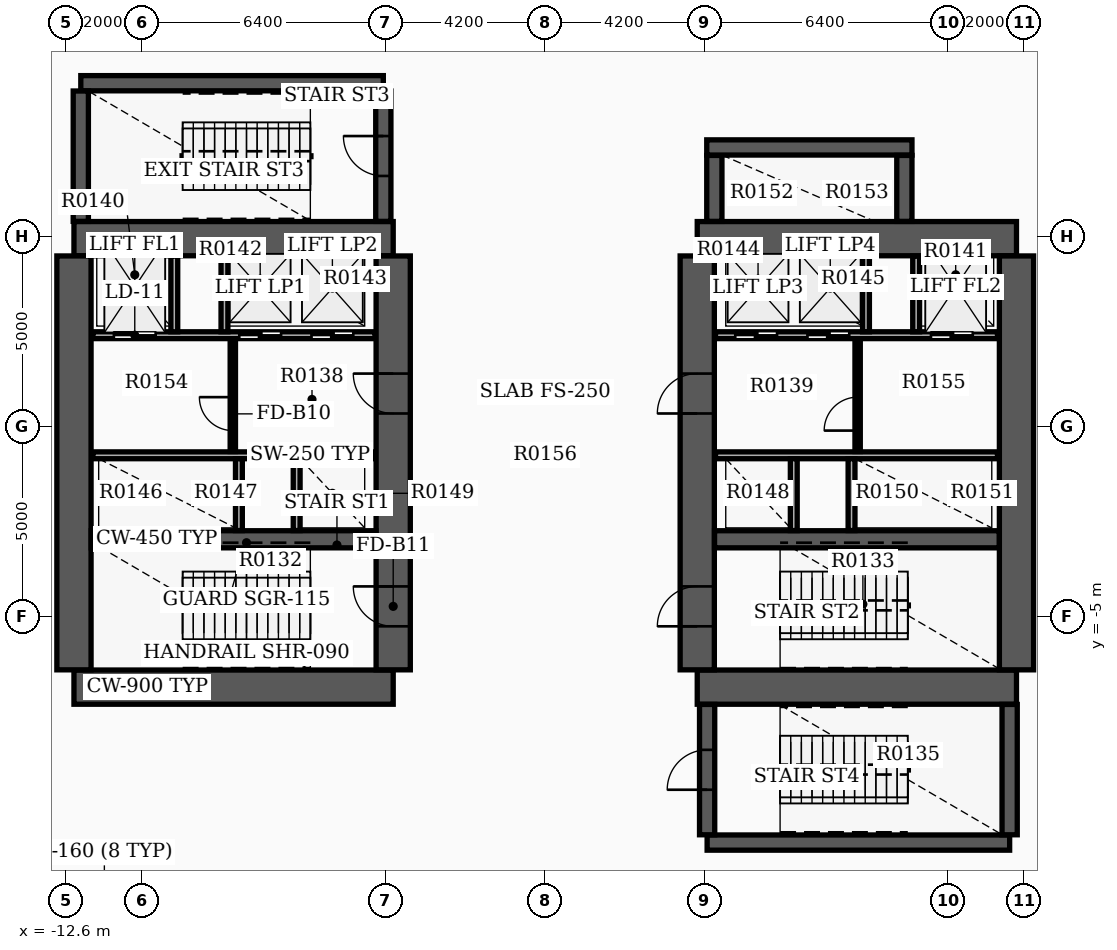
"""IFC4 building model, lengths in metres.
Left out: names, types, materials, properties, quantities, classifications, styles, units other than length and angle.
Written with IfcOpenShell. Run it as: python <this file> out.ifc"""

import sys

from ifc_helpers import new_model, si_unit, direction, frame, frame_2d, origin, place, context, subcontext, project, spatial, rectangle, extrude, element, fill, save


model = new_model("IFC4")
c1 = context("Model", 3, precision=1e-05, world=origin(), true_north=direction((0.0, 1.0)))
c2 = subcontext(c1, "Body", "Model", "MODEL_VIEW")
j1 = project(units=[si_unit("LENGTHUNIT", "METRE"), si_unit("PLANEANGLEUNIT", "RADIAN")], contexts=[c1])
p1 = place(None, origin())
s1 = spatial("IfcSite", under=j1, at=p1, CompositionType="ELEMENT")
p2 = place(p1, origin())
s2 = spatial("IfcBuilding", under=s1, at=p2, CompositionType="ELEMENT")
p3 = place(p2, frame((0.0, 0.0, 5.4)))
s3 = spatial("IfcBuildingStorey", under=s2, at=p3, CompositionType="ELEMENT", Elevation=5.4)
for number, where, z_axis, x_axis in (
    (1, (-12.4, -6.85, 0.0), (0.0, 0.0, 1.0), (1.0, 0.0, 0.0)),
    (2, (-12.4, 4.95, 0.0), (0.0, 0.0, 1.0), (1.0, 0.0, 0.0)),
):
    element("IfcWall", number, at=place(p3, frame(where, z_axis=z_axis, x_axis=x_axis)), inside=s3, PredefinedType="SHEAR", context=c2, shape_type="SweptSolid", body=[
        extrude(rectangle(XDim=8.4, YDim=0.9, at=frame_2d((4.2, 0.0))), origin(), (0.0, 0.0, 1.0), 4.55),
    ])
p4 = place(p3, frame((-12.4, -6.395, 0.0), z_axis=(0.0, 0.0, 1.0), x_axis=(0.0, 1.0, 0.0)))
e3 = element("IfcWall", 3, at=p4, inside=s3, PredefinedType="SHEAR", context=c2, shape_type="SweptSolid", body=[
    extrude(rectangle(XDim=10.89, YDim=0.9, at=frame_2d((5.445, 0.0))), origin(), (0.0, 0.0, 1.0), 4.55),
])
p5 = place(p3, frame((-4.0, -6.395, 0.0), z_axis=(0.0, 0.0, 1.0), x_axis=(0.0, 1.0, 0.0)))
e4 = element("IfcWall", 4, at=p5, inside=s3, PredefinedType="SHEAR", context=c2, shape_type="SweptSolid", body=[
    extrude(rectangle(XDim=10.89, YDim=0.9, at=frame_2d((5.445, 0.0))), origin(), (0.0, 0.0, 1.0), 4.55),
])
p6 = place(p5, frame((1.145, 0.0, 0.0)))
e5 = element("IfcOpeningElement", 5, at=p6, cuts=e4, PredefinedType="OPENING", context=c2, shape_type="SweptSolid", body=[
    extrude(rectangle(XDim=1.05, YDim=2.15, at=frame_2d((0.525, 1.075))), frame((0.0, 0.46, 0.0), z_axis=(0.0, -1.0, 0.0), x_axis=(1.0, 0.0, 0.0)), (0.0, 0.0, 1.0), 0.92),
])
p7 = place(p5, frame((6.745, 0.0, 0.0)))
e6 = element("IfcOpeningElement", 6, at=p7, cuts=e4, PredefinedType="OPENING", context=c2, shape_type="SweptSolid", body=[
    extrude(rectangle(XDim=1.05, YDim=2.15, at=frame_2d((0.525, 1.075))), frame((0.0, 0.46, 0.0), z_axis=(0.0, -1.0, 0.0), x_axis=(1.0, 0.0, 0.0)), (0.0, 0.0, 1.0), 0.92),
])
p8 = place(p3, frame((-11.945, -2.96, 0.0), z_axis=(0.0, 0.0, 1.0), x_axis=(1.0, 0.0, 0.0)))
e7 = element("IfcWall", 7, at=p8, inside=s3, PredefinedType="SHEAR", context=c2, shape_type="SweptSolid", body=[
    extrude(rectangle(XDim=7.49, YDim=0.45, at=frame_2d((3.745, 0.0))), origin(), (0.0, 0.0, 1.0), 4.55),
])
for number, where, z_axis, x_axis in (
    (8, (4.0, -6.85, 0.0), (0.0, 0.0, 1.0), (1.0, 0.0, 0.0)),
    (9, (4.0, 4.95, 0.0), (0.0, 0.0, 1.0), (1.0, 0.0, 0.0)),
):
    element("IfcWall", number, at=place(p3, frame(where, z_axis=z_axis, x_axis=x_axis)), inside=s3, PredefinedType="SHEAR", context=c2, shape_type="SweptSolid", body=[
        extrude(rectangle(XDim=8.4, YDim=0.9, at=frame_2d((4.2, 0.0))), origin(), (0.0, 0.0, 1.0), 4.55),
    ])
p9 = place(p3, frame((4.0, -6.395, 0.0), z_axis=(0.0, 0.0, 1.0), x_axis=(0.0, 1.0, 0.0)))
e10 = element("IfcWall", 10, at=p9, inside=s3, PredefinedType="SHEAR", context=c2, shape_type="SweptSolid", body=[
    extrude(rectangle(XDim=10.89, YDim=0.9, at=frame_2d((5.445, 0.0))), origin(), (0.0, 0.0, 1.0), 4.55),
])
p10 = place(p9, frame((1.145, 0.0, 0.0)))
e11 = element("IfcOpeningElement", 11, at=p10, cuts=e10, PredefinedType="OPENING", context=c2, shape_type="SweptSolid", body=[
    extrude(rectangle(XDim=1.05, YDim=2.15, at=frame_2d((0.525, 1.075))), frame((0.0, 0.46, 0.0), z_axis=(0.0, -1.0, 0.0), x_axis=(1.0, 0.0, 0.0)), (0.0, 0.0, 1.0), 0.92),
])
p11 = place(p9, frame((6.745, 0.0, 0.0)))
e12 = element("IfcOpeningElement", 12, at=p11, cuts=e10, PredefinedType="OPENING", context=c2, shape_type="SweptSolid", body=[
    extrude(rectangle(XDim=1.05, YDim=2.15, at=frame_2d((0.525, 1.075))), frame((0.0, 0.46, 0.0), z_axis=(0.0, -1.0, 0.0), x_axis=(1.0, 0.0, 0.0)), (0.0, 0.0, 1.0), 0.92),
])
p12 = place(p3, frame((12.4, -6.395, 0.0), z_axis=(0.0, 0.0, 1.0), x_axis=(0.0, 1.0, 0.0)))
e13 = element("IfcWall", 13, at=p12, inside=s3, PredefinedType="SHEAR", context=c2, shape_type="SweptSolid", body=[
    extrude(rectangle(XDim=10.89, YDim=0.9, at=frame_2d((5.445, 0.0))), origin(), (0.0, 0.0, 1.0), 4.55),
])
p13 = place(p3, frame((4.455, -2.96, 0.0), z_axis=(0.0, 0.0, 1.0), x_axis=(1.0, 0.0, 0.0)))
e14 = element("IfcWall", 14, at=p13, inside=s3, PredefinedType="SHEAR", context=c2, shape_type="SweptSolid", body=[
    extrude(rectangle(XDim=7.49, YDim=0.45, at=frame_2d((3.745, 0.0))), origin(), (0.0, 0.0, 1.0), 4.55),
])
p14 = place(p3, frame((-12.22, 9.04, 0.0), z_axis=(0.0, 0.0, 1.0), x_axis=(1.0, 0.0, 0.0)))
e15 = element("IfcWall", 15, at=p14, inside=s3, PredefinedType="SHEAR", context=c2, shape_type="SweptSolid", body=[
    extrude(rectangle(XDim=7.96, YDim=0.4, at=frame_2d((3.98, 0.0))), origin(), (0.0, 0.0, 1.0), 4.55),
])
p15 = place(p3, frame((-12.22, 5.405, 0.0), z_axis=(0.0, 0.0, 1.0), x_axis=(0.0, 1.0, 0.0)))
e16 = element("IfcWall", 16, at=p15, inside=s3, PredefinedType="SHEAR", context=c2, shape_type="SweptSolid", body=[
    extrude(rectangle(XDim=3.43, YDim=0.4, at=frame_2d((1.715, 0.0))), origin(), (0.0, 0.0, 1.0), 4.55),
])
p16 = place(p3, frame((-4.26, 5.405, 0.0), z_axis=(0.0, 0.0, 1.0), x_axis=(0.0, 1.0, 0.0)))
e17 = element("IfcWall", 17, at=p16, inside=s3, PredefinedType="SHEAR", context=c2, shape_type="SweptSolid", body=[
    extrude(rectangle(XDim=3.43, YDim=0.4, at=frame_2d((1.715, 0.0))), origin(), (0.0, 0.0, 1.0), 4.55),
])
p17 = place(p16, frame((1.195, 0.0, 0.0)))
e18 = element("IfcOpeningElement", 18, at=p17, cuts=e17, PredefinedType="OPENING", context=c2, shape_type="SweptSolid", body=[
    extrude(rectangle(XDim=1.05, YDim=2.15, at=frame_2d((0.525, 1.075))), frame((0.0, 0.21, 0.0), z_axis=(0.0, -1.0, 0.0), x_axis=(1.0, 0.0, 0.0)), (0.0, 0.0, 1.0), 0.42),
])
p18 = place(p3, frame((4.26, -10.94, 0.0), z_axis=(0.0, 0.0, 1.0), x_axis=(1.0, 0.0, 0.0)))
e19 = element("IfcWall", 19, at=p18, inside=s3, PredefinedType="SHEAR", context=c2, shape_type="SweptSolid", body=[
    extrude(rectangle(XDim=7.96, YDim=0.4, at=frame_2d((3.98, 0.0))), origin(), (0.0, 0.0, 1.0), 4.55),
])
p19 = place(p3, frame((4.26, -10.735, 0.0), z_axis=(0.0, 0.0, 1.0), x_axis=(0.0, 1.0, 0.0)))
e20 = element("IfcWall", 20, at=p19, inside=s3, PredefinedType="SHEAR", context=c2, shape_type="SweptSolid", body=[
    extrude(rectangle(XDim=3.43, YDim=0.4, at=frame_2d((1.715, 0.0))), origin(), (0.0, 0.0, 1.0), 4.55),
])
p20 = place(p19, frame((1.185, 0.0, 0.0)))
e21 = element("IfcOpeningElement", 21, at=p20, cuts=e20, PredefinedType="OPENING", context=c2, shape_type="SweptSolid", body=[
    extrude(rectangle(XDim=1.05, YDim=2.15, at=frame_2d((0.525, 1.075))), frame((0.0, 0.21, 0.0), z_axis=(0.0, -1.0, 0.0), x_axis=(1.0, 0.0, 0.0)), (0.0, 0.0, 1.0), 0.42),
])
p21 = place(p3, frame((12.22, -10.735, 0.0), z_axis=(0.0, 0.0, 1.0), x_axis=(0.0, 1.0, 0.0)))
e22 = element("IfcWall", 22, at=p21, inside=s3, PredefinedType="SHEAR", context=c2, shape_type="SweptSolid", body=[
    extrude(rectangle(XDim=3.43, YDim=0.4, at=frame_2d((1.715, 0.0))), origin(), (0.0, 0.0, 1.0), 4.55),
])
p22 = place(p3, frame((4.45, 5.405, 0.0), z_axis=(0.0, 0.0, 1.0), x_axis=(0.0, 1.0, 0.0)))
e23 = element("IfcWall", 23, at=p22, inside=s3, PredefinedType="SHEAR", context=c2, shape_type="SweptSolid", body=[
    extrude(rectangle(XDim=1.735, YDim=0.4, at=frame_2d((0.867, 0.0))), origin(), (0.0, 0.0, 1.0), 4.55),
])
p23 = place(p3, frame((4.25, 7.35, 0.0), z_axis=(0.0, 0.0, 1.0), x_axis=(1.0, 0.0, 0.0)))
e24 = element("IfcWall", 24, at=p23, inside=s3, PredefinedType="SHEAR", context=c2, shape_type="SweptSolid", body=[
    extrude(rectangle(XDim=5.4, YDim=0.4, at=frame_2d((2.7, 0.0))), origin(), (0.0, 0.0, 1.0), 4.55),
])
p24 = place(p3, frame((9.45, 5.405, 0.0), z_axis=(0.0, 0.0, 1.0), x_axis=(0.0, 1.0, 0.0)))
e25 = element("IfcWall", 25, at=p24, inside=s3, PredefinedType="SHEAR", context=c2, shape_type="SweptSolid", body=[
    extrude(rectangle(XDim=1.735, YDim=0.4, at=frame_2d((0.867, 0.0))), origin(), (0.0, 0.0, 1.0), 4.55),
])
p25 = place(p3, frame((-11.9, 2.41, 0.0), z_axis=(0.0, 0.0, 1.0), x_axis=(1.0, 0.0, 0.0)))
e26 = element("IfcWall", 26, at=p25, inside=s3, PredefinedType="SOLIDWALL", context=c2, shape_type="SweptSolid", body=[
    extrude(rectangle(XDim=7.42, YDim=0.18, at=frame_2d((3.71, 0.0))), origin(), (0.0, 0.0, 1.0), 3.62),
])
p26 = place(p25, frame((0.55, 0.0, 0.0)))
e27 = element("IfcOpeningElement", 27, at=p26, cuts=e26, PredefinedType="OPENING", context=c2, shape_type="SweptSolid", body=[
    extrude(rectangle(XDim=1.1, YDim=2.15, at=frame_2d((0.55, 1.075))), frame((0.0, 0.1, 0.0), z_axis=(0.0, -1.0, 0.0), x_axis=(1.0, 0.0, 0.0)), (0.0, 0.0, 1.0), 0.2),
])
p27 = place(p25, frame((3.85, 0.0, 0.0)))
e28 = element("IfcOpeningElement", 28, at=p27, cuts=e26, PredefinedType="OPENING", context=c2, shape_type="SweptSolid", body=[
    extrude(rectangle(XDim=1.1, YDim=2.15, at=frame_2d((0.55, 1.075))), frame((0.0, 0.1, 0.0), z_axis=(0.0, -1.0, 0.0), x_axis=(1.0, 0.0, 0.0)), (0.0, 0.0, 1.0), 0.2),
])
p28 = place(p25, frame((5.75, 0.0, 0.0)))
e29 = element("IfcOpeningElement", 29, at=p28, cuts=e26, PredefinedType="OPENING", context=c2, shape_type="SweptSolid", body=[
    extrude(rectangle(XDim=1.1, YDim=2.15, at=frame_2d((0.55, 1.075))), frame((0.0, 0.1, 0.0), z_axis=(0.0, -1.0, 0.0), x_axis=(1.0, 0.0, 0.0)), (0.0, 0.0, 1.0), 0.2),
])
p29 = place(p3, frame((4.48, 2.41, 0.0), z_axis=(0.0, 0.0, 1.0), x_axis=(1.0, 0.0, 0.0)))
e30 = element("IfcWall", 30, at=p29, inside=s3, PredefinedType="SOLIDWALL", context=c2, shape_type="SweptSolid", body=[
    extrude(rectangle(XDim=7.42, YDim=0.18, at=frame_2d((3.71, 0.0))), origin(), (0.0, 0.0, 1.0), 3.62),
])
p30 = place(p29, frame((5.67, 0.0, 0.0)))
e31 = element("IfcOpeningElement", 31, at=p30, cuts=e30, PredefinedType="OPENING", context=c2, shape_type="SweptSolid", body=[
    extrude(rectangle(XDim=1.1, YDim=2.15, at=frame_2d((0.55, 1.075))), frame((0.0, 0.1, 0.0), z_axis=(0.0, -1.0, 0.0), x_axis=(1.0, 0.0, 0.0)), (0.0, 0.0, 1.0), 0.2),
])
p31 = place(p29, frame((0.52, 0.0, 0.0)))
e32 = element("IfcOpeningElement", 32, at=p31, cuts=e30, PredefinedType="OPENING", context=c2, shape_type="SweptSolid", body=[
    extrude(rectangle(XDim=1.1, YDim=2.15, at=frame_2d((0.55, 1.075))), frame((0.0, 0.1, 0.0), z_axis=(0.0, -1.0, 0.0), x_axis=(1.0, 0.0, 0.0)), (0.0, 0.0, 1.0), 0.2),
])
p32 = place(p29, frame((2.42, 0.0, 0.0)))
e33 = element("IfcOpeningElement", 33, at=p32, cuts=e30, PredefinedType="OPENING", context=c2, shape_type="SweptSolid", body=[
    extrude(rectangle(XDim=1.1, YDim=2.15, at=frame_2d((0.55, 1.075))), frame((0.0, 0.1, 0.0), z_axis=(0.0, -1.0, 0.0), x_axis=(1.0, 0.0, 0.0)), (0.0, 0.0, 1.0), 0.2),
])
for number, where, z_axis, x_axis in (
    (34, (-11.9, -0.75, 0.0), (0.0, 0.0, 1.0), (1.0, 0.0, 0.0)),
    (35, (4.48, -0.75, 0.0), (0.0, 0.0, 1.0), (1.0, 0.0, 0.0)),
):
    element("IfcWall", number, at=place(p3, frame(where, z_axis=z_axis, x_axis=x_axis)), inside=s3, PredefinedType="SOLIDWALL", context=c2, shape_type="SweptSolid", body=[
        extrude(rectangle(XDim=7.42, YDim=0.18, at=frame_2d((3.71, 0.0))), origin(), (0.0, 0.0, 1.0), 3.62),
    ])
for number, where, z_axis, x_axis in (
    (36, (-9.76, 2.5, 0.0), (0.0, 0.0, 1.0), (0.0, 1.0, 0.0)),
    (37, (-8.44, 2.5, 0.0), (0.0, 0.0, 1.0), (0.0, 1.0, 0.0)),
    (38, (8.44, 2.5, 0.0), (0.0, 0.0, 1.0), (0.0, 1.0, 0.0)),
    (39, (9.76, 2.5, 0.0), (0.0, 0.0, 1.0), (0.0, 1.0, 0.0)),
):
    element("IfcWall", number, at=place(p3, frame(where, z_axis=z_axis, x_axis=x_axis)), inside=s3, PredefinedType="SOLIDWALL", context=c2, shape_type="SweptSolid", body=[
        extrude(rectangle(XDim=1.99, YDim=0.18, at=frame_2d((0.995, 0.0))), origin(), (0.0, 0.0, 1.0), 3.62),
    ])
for number, where, z_axis, x_axis in (
    (40, (-8.06, -2.73, 0.0), (0.0, 0.0, 1.0), (0.0, 1.0, 0.0)),
    (41, (-6.54, -2.73, 0.0), (0.0, 0.0, 1.0), (0.0, 1.0, 0.0)),
    (42, (6.54, -2.73, 0.0), (0.0, 0.0, 1.0), (0.0, 1.0, 0.0)),
    (43, (8.06, -2.73, 0.0), (0.0, 0.0, 1.0), (0.0, 1.0, 0.0)),
):
    element("IfcWall", number, at=place(p3, frame(where, z_axis=z_axis, x_axis=x_axis)), inside=s3, PredefinedType="SOLIDWALL", context=c2, shape_type="SweptSolid", body=[
        extrude(rectangle(XDim=1.89, YDim=0.18, at=frame_2d((0.945, 0.0))), origin(), (0.0, 0.0, 1.0), 3.62),
    ])
p33 = place(p3, frame((-8.22, -0.65, 0.0), z_axis=(0.0, 0.0, 1.0), x_axis=(0.0, 1.0, 0.0)))
e44 = element("IfcWall", 44, at=p33, inside=s3, PredefinedType="SOLIDWALL", context=c2, shape_type="SweptSolid", body=[
    extrude(rectangle(XDim=2.96, YDim=0.14, at=frame_2d((1.48, 0.0))), origin(), (0.0, 0.0, 1.0), 3.62),
])
p34 = place(p33, frame((0.55, 0.0, 0.0)))
e45 = element("IfcOpeningElement", 45, at=p34, cuts=e44, PredefinedType="OPENING", context=c2, shape_type="SweptSolid", body=[
    extrude(rectangle(XDim=0.88, YDim=2.1, at=frame_2d((0.44, 1.05))), frame((0.0, 0.08, 0.0), z_axis=(0.0, -1.0, 0.0), x_axis=(1.0, 0.0, 0.0)), (0.0, 0.0, 1.0), 0.16),
])
p35 = place(p3, frame((8.22, -0.65, 0.0), z_axis=(0.0, 0.0, 1.0), x_axis=(0.0, 1.0, 0.0)))
e46 = element("IfcWall", 46, at=p35, inside=s3, PredefinedType="SOLIDWALL", context=c2, shape_type="SweptSolid", body=[
    extrude(rectangle(XDim=2.96, YDim=0.14, at=frame_2d((1.48, 0.0))), origin(), (0.0, 0.0, 1.0), 3.62),
])
p36 = place(p35, frame((0.55, 0.0, 0.0)))
e47 = element("IfcOpeningElement", 47, at=p36, cuts=e46, PredefinedType="OPENING", context=c2, shape_type="SweptSolid", body=[
    extrude(rectangle(XDim=0.88, YDim=2.1, at=frame_2d((0.44, 1.05))), frame((0.0, 0.08, 0.0), z_axis=(0.0, -1.0, 0.0), x_axis=(1.0, 0.0, 0.0)), (0.0, 0.0, 1.0), 0.16),
])
p37 = place(p6, origin())
e48 = element("IfcDoor", 48, at=p37, inside=s3, OperationType="SINGLE_SWING_RIGHT", PredefinedType="DOOR", context=c2, shape_type="SweptSolid", body=[
    extrude(rectangle(XDim=1.05, YDim=2.15, at=frame_2d((0.525, 1.075))), frame((0.0, 0.025, 0.0), z_axis=(0.0, -1.0, 0.0), x_axis=(1.0, 0.0, 0.0)), (0.0, 0.0, 1.0), 0.05),
])
fill(e5, e48)
p38 = place(p10, origin())
e49 = element("IfcDoor", 49, at=p38, inside=s3, OperationType="SINGLE_SWING_LEFT", PredefinedType="DOOR", context=c2, shape_type="SweptSolid", body=[
    extrude(rectangle(XDim=1.05, YDim=2.15, at=frame_2d((0.525, 1.075))), frame((0.0, 0.025, 0.0), z_axis=(0.0, -1.0, 0.0), x_axis=(1.0, 0.0, 0.0)), (0.0, 0.0, 1.0), 0.05),
])
fill(e11, e49)
p39 = place(p7, origin())
e50 = element("IfcDoor", 50, at=p39, inside=s3, OperationType="SINGLE_SWING_RIGHT", PredefinedType="DOOR", context=c2, shape_type="SweptSolid", body=[
    extrude(rectangle(XDim=1.05, YDim=2.15, at=frame_2d((0.525, 1.075))), frame((0.0, 0.025, 0.0), z_axis=(0.0, -1.0, 0.0), x_axis=(1.0, 0.0, 0.0)), (0.0, 0.0, 1.0), 0.05),
])
fill(e6, e50)
p40 = place(p11, origin())
e51 = element("IfcDoor", 51, at=p40, inside=s3, OperationType="SINGLE_SWING_LEFT", PredefinedType="DOOR", context=c2, shape_type="SweptSolid", body=[
    extrude(rectangle(XDim=1.05, YDim=2.15, at=frame_2d((0.525, 1.075))), frame((0.0, 0.025, 0.0), z_axis=(0.0, -1.0, 0.0), x_axis=(1.0, 0.0, 0.0)), (0.0, 0.0, 1.0), 0.05),
])
fill(e12, e51)
p41 = place(p17, origin())
e52 = element("IfcDoor", 52, at=p41, inside=s3, OperationType="SINGLE_SWING_RIGHT", PredefinedType="DOOR", context=c2, shape_type="SweptSolid", body=[
    extrude(rectangle(XDim=1.05, YDim=2.15, at=frame_2d((0.525, 1.075))), frame((0.0, 0.025, 0.0), z_axis=(0.0, -1.0, 0.0), x_axis=(1.0, 0.0, 0.0)), (0.0, 0.0, 1.0), 0.05),
])
fill(e18, e52)
p42 = place(p20, origin())
e53 = element("IfcDoor", 53, at=p42, inside=s3, OperationType="SINGLE_SWING_LEFT", PredefinedType="DOOR", context=c2, shape_type="SweptSolid", body=[
    extrude(rectangle(XDim=1.05, YDim=2.15, at=frame_2d((0.525, 1.075))), frame((0.0, 0.025, 0.0), z_axis=(0.0, -1.0, 0.0), x_axis=(1.0, 0.0, 0.0)), (0.0, 0.0, 1.0), 0.05),
])
fill(e21, e53)
p43 = place(p26, origin())
e54 = element("IfcDoor", 54, at=p43, inside=s3, OperationType="DOUBLE_DOOR_SLIDING", PredefinedType="DOOR", context=c2, shape_type="SweptSolid", body=[
    extrude(rectangle(XDim=1.1, YDim=2.15, at=frame_2d((0.55, 1.075))), frame((0.0, 0.025, 0.0), z_axis=(0.0, -1.0, 0.0), x_axis=(1.0, 0.0, 0.0)), (0.0, 0.0, 1.0), 0.05),
])
fill(e27, e54)
p44 = place(p30, origin())
e55 = element("IfcDoor", 55, at=p44, inside=s3, OperationType="DOUBLE_DOOR_SLIDING", PredefinedType="DOOR", context=c2, shape_type="SweptSolid", body=[
    extrude(rectangle(XDim=1.1, YDim=2.15, at=frame_2d((0.55, 1.075))), frame((0.0, 0.025, 0.0), z_axis=(0.0, -1.0, 0.0), x_axis=(1.0, 0.0, 0.0)), (0.0, 0.0, 1.0), 0.05),
])
fill(e31, e55)
p45 = place(p27, origin())
e56 = element("IfcDoor", 56, at=p45, inside=s3, OperationType="DOUBLE_DOOR_SLIDING", PredefinedType="DOOR", context=c2, shape_type="SweptSolid", body=[
    extrude(rectangle(XDim=1.1, YDim=2.15, at=frame_2d((0.55, 1.075))), frame((0.0, 0.025, 0.0), z_axis=(0.0, -1.0, 0.0), x_axis=(1.0, 0.0, 0.0)), (0.0, 0.0, 1.0), 0.05),
])
fill(e28, e56)
p46 = place(p28, origin())
e57 = element("IfcDoor", 57, at=p46, inside=s3, OperationType="DOUBLE_DOOR_SLIDING", PredefinedType="DOOR", context=c2, shape_type="SweptSolid", body=[
    extrude(rectangle(XDim=1.1, YDim=2.15, at=frame_2d((0.55, 1.075))), frame((0.0, 0.025, 0.0), z_axis=(0.0, -1.0, 0.0), x_axis=(1.0, 0.0, 0.0)), (0.0, 0.0, 1.0), 0.05),
])
fill(e29, e57)
p47 = place(p31, origin())
e58 = element("IfcDoor", 58, at=p47, inside=s3, OperationType="DOUBLE_DOOR_SLIDING", PredefinedType="DOOR", context=c2, shape_type="SweptSolid", body=[
    extrude(rectangle(XDim=1.1, YDim=2.15, at=frame_2d((0.55, 1.075))), frame((0.0, 0.025, 0.0), z_axis=(0.0, -1.0, 0.0), x_axis=(1.0, 0.0, 0.0)), (0.0, 0.0, 1.0), 0.05),
])
fill(e32, e58)
p48 = place(p32, origin())
e59 = element("IfcDoor", 59, at=p48, inside=s3, OperationType="DOUBLE_DOOR_SLIDING", PredefinedType="DOOR", context=c2, shape_type="SweptSolid", body=[
    extrude(rectangle(XDim=1.1, YDim=2.15, at=frame_2d((0.55, 1.075))), frame((0.0, 0.025, 0.0), z_axis=(0.0, -1.0, 0.0), x_axis=(1.0, 0.0, 0.0)), (0.0, 0.0, 1.0), 0.05),
])
fill(e33, e59)
p49 = place(p34, origin())
e60 = element("IfcDoor", 60, at=p49, inside=s3, OperationType="SINGLE_SWING_RIGHT", PredefinedType="DOOR", context=c2, shape_type="SweptSolid", body=[
    extrude(rectangle(XDim=0.88, YDim=2.1, at=frame_2d((0.44, 1.05))), frame((0.0, 0.025, 0.0), z_axis=(0.0, -1.0, 0.0), x_axis=(1.0, 0.0, 0.0)), (0.0, 0.0, 1.0), 0.05),
])
fill(e45, e60)
p50 = place(p36, origin())
e61 = element("IfcDoor", 61, at=p50, inside=s3, OperationType="SINGLE_SWING_LEFT", PredefinedType="DOOR", context=c2, shape_type="SweptSolid", body=[
    extrude(rectangle(XDim=0.88, YDim=2.1, at=frame_2d((0.44, 1.05))), frame((0.0, 0.025, 0.0), z_axis=(0.0, -1.0, 0.0), x_axis=(1.0, 0.0, 0.0)), (0.0, 0.0, 1.0), 0.05),
])
fill(e47, e61)
save(model, sys.argv[1])
